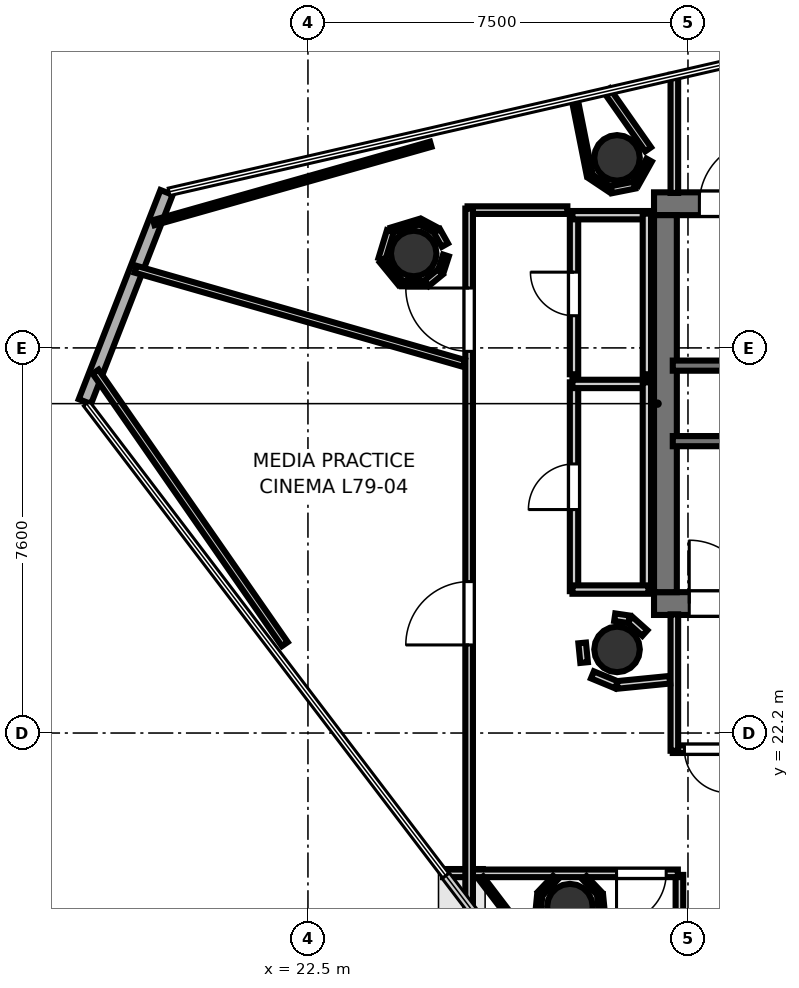
"""IFC4 building model, lengths in metres.
Left out: names, types, materials, properties, quantities, classifications, styles, units other than length and angle.
Written with IfcOpenShell. Run it as: python <this file> out.ifc"""

import sys

from ifc_helpers import new_model, si_unit, direction, frame, frame_2d, origin, origin_2d, place, context, subcontext, project, spatial, rectangle, hollow_circle, extrude, element, fill, save


model = new_model("IFC4")
c1 = context("Model", 3, precision=1e-05, world=origin(), true_north=direction((0.0, 1.0)))
c2 = subcontext(c1, "Body", "Model", "MODEL_VIEW")
j1 = project(units=[si_unit("LENGTHUNIT", "METRE"), si_unit("PLANEANGLEUNIT", "RADIAN")], contexts=[c1])
p1 = place(None, origin())
s1 = spatial("IfcSite", under=j1, at=p1, CompositionType="ELEMENT")
p2 = place(p1, origin())
s2 = spatial("IfcBuilding", under=s1, at=p2, CompositionType="ELEMENT")
p3 = place(p2, frame((0.0, 0.0, 306.5)))
s3 = spatial("IfcBuildingStorey", under=s2, at=p3, CompositionType="ELEMENT", Elevation=306.5)
p4 = place(p3, frame((29.33, 32.645, 0.0), z_axis=(0.0, 0.0, 1.0), x_axis=(1.0, 0.0, 0.0)))
e1 = element("IfcWall", 1, at=p4, inside=s3, PredefinedType="SHEAR", context=c2, shape_type="SweptSolid", body=[
    extrude(rectangle(XDim=10.52, YDim=0.45, at=frame_2d((5.26, 0.0))), origin(), (0.0, 0.0, 1.0), 3.52),
])
p5 = place(p4, frame((0.895, 0.0, 0.0)))
e2 = element("IfcOpeningElement", 2, at=p5, cuts=e1, PredefinedType="OPENING", context=c2, shape_type="SweptSolid", body=[
    extrude(rectangle(XDim=1.25, YDim=2.15, at=frame_2d((0.625, 1.075))), frame((0.0, 0.235, 0.0), z_axis=(0.0, -1.0, 0.0), x_axis=(1.0, 0.0, 0.0)), (0.0, 0.0, 1.0), 0.47),
])
p6 = place(p3, frame((29.33, 24.755, 0.0), z_axis=(0.0, 0.0, 1.0), x_axis=(1.0, 0.0, 0.0)))
e3 = element("IfcWall", 3, at=p6, inside=s3, PredefinedType="SHEAR", context=c2, shape_type="SweptSolid", body=[
    extrude(rectangle(XDim=10.52, YDim=0.45, at=frame_2d((5.26, 0.0))), origin(), (0.0, 0.0, 1.0), 3.52),
])
p7 = place(p6, frame((0.695, 0.0, 0.0)))
e4 = element("IfcOpeningElement", 4, at=p7, cuts=e3, PredefinedType="OPENING", context=c2, shape_type="SweptSolid", body=[
    extrude(rectangle(XDim=1.25, YDim=2.15, at=frame_2d((0.625, 1.075))), frame((0.0, 0.235, 0.0), z_axis=(0.0, -1.0, 0.0), x_axis=(1.0, 0.0, 0.0)), (0.0, 0.0, 1.0), 0.47),
])
p8 = place(p3, frame((29.555, 24.98, 0.0), z_axis=(0.0, 0.0, 1.0), x_axis=(0.0, 1.0, 0.0)))
e5 = element("IfcWall", 5, at=p8, inside=s3, PredefinedType="SHEAR", context=c2, shape_type="SweptSolid", body=[
    extrude(rectangle(XDim=7.44, YDim=0.45, at=frame_2d((3.72, 0.0))), origin(), (0.0, 0.0, 1.0), 3.52),
])
for number, where, z_axis, x_axis in (
    (6, (28.6, 33.55, 0.0), (0.0, 0.0, 1.0), (1.0, 0.0, 0.0)),
    (7, (28.6, 23.85, 0.0), (0.0, 0.0, 1.0), (1.0, 0.0, 0.0)),
    (8, (24.587, 31.663, 0.0), (0.0, 0.0, 1.0), (1.0, 0.0, 0.0)),
    (9, (27.67, 18.774, 0.0), (0.0, 0.0, 1.0), (1.0, 0.0, 0.0)),
):
    element("IfcColumn", number, at=place(p3, frame(where, z_axis=z_axis, x_axis=x_axis)), inside=s3, PredefinedType="COLUMN", context=c2, shape_type="SweptSolid", body=[
        extrude(hollow_circle(Radius=0.45, WallThickness=0.025, at=origin_2d()), origin(), (0.0, 0.0, 1.0), 3.7),
    ])
p9 = place(p3, frame((19.71, 32.869, 0.0), z_axis=(0.0, 0.0, 1.0), x_axis=(-0.363769866346, -0.931488853577, 0.0)))
e10 = element("IfcWall", 10, at=p9, inside=s3, PredefinedType="SOLIDWALL", context=c2, shape_type="SweptSolid", body=[
    extrude(rectangle(XDim=4.432, YDim=0.26, at=frame_2d((2.216, 0.0))), origin(), (0.0, 0.0, 1.0), 3.52),
])
p10 = place(p3, frame((29.7, 29.45, 0.0), z_axis=(0.0, 0.0, 1.0), x_axis=(1.0, 0.0, 0.0)))
e11 = element("IfcWall", 11, at=p10, inside=s3, PredefinedType="SOLIDWALL", context=c2, shape_type="SweptSolid", body=[
    extrude(rectangle(XDim=8.3, YDim=0.2, at=frame_2d((4.15, 0.0))), origin(), (0.0, 0.0, 1.0), 3.52),
])
p11 = place(p3, frame((29.7, 27.96, 0.0), z_axis=(0.0, 0.0, 1.0), x_axis=(1.0, 0.0, 0.0)))
e12 = element("IfcWall", 12, at=p11, inside=s3, PredefinedType="SOLIDWALL", context=c2, shape_type="SweptSolid", body=[
    extrude(rectangle(XDim=7.75, YDim=0.2, at=frame_2d((3.875, 0.0))), origin(), (0.0, 0.0, 1.0), 3.52),
])
p12 = place(p3, frame((29.731, 32.858, 0.0), z_axis=(0.0, 0.0, 1.0), x_axis=(0.0, 1.0, 0.0)))
e13 = element("IfcWall", 13, at=p12, inside=s3, PredefinedType="PARTITIONING", context=c2, shape_type="SweptSolid", body=[
    extrude(rectangle(XDim=2.331, YDim=0.15, at=frame_2d((1.166, 0.0))), origin(), (0.0, 0.0, 1.0), 2.84),
])
p13 = place(p3, frame((33.45, 21.881, 0.0), z_axis=(0.0, 0.0, 1.0), x_axis=(-1.0, 0.0, 0.0)))
e14 = element("IfcWall", 14, at=p13, inside=s3, PredefinedType="PARTITIONING", context=c2, shape_type="SweptSolid", body=[
    extrude(rectangle(XDim=3.75, YDim=0.15, at=frame_2d((1.875, 0.0))), origin(), (0.0, 0.0, 1.0), 2.84),
])
p14 = place(p13, frame((1.275, 0.0, 0.0)))
e15 = element("IfcOpeningElement", 15, at=p14, cuts=e14, PredefinedType="OPENING", context=c2, shape_type="SweptSolid", body=[
    extrude(rectangle(XDim=1.2, YDim=2.15, at=frame_2d((0.6, 1.075))), frame((0.0, 0.085, 0.0), z_axis=(0.0, -1.0, 0.0), x_axis=(1.0, 0.0, 0.0)), (0.0, 0.0, 1.0), 0.17),
])
p15 = place(p13, frame((2.66, 0.0, 0.0)))
e16 = element("IfcOpeningElement", 16, at=p15, cuts=e14, PredefinedType="OPENING", context=c2, shape_type="SweptSolid", body=[
    extrude(rectangle(XDim=0.86, YDim=2.05, at=frame_2d((0.43, 1.025))), frame((0.0, 0.085, 0.0), z_axis=(0.0, -1.0, 0.0), x_axis=(1.0, 0.0, 0.0)), (0.0, 0.0, 1.0), 0.17),
])
p16 = place(p3, frame((29.731, 21.85, 0.0), z_axis=(0.0, 0.0, 1.0), x_axis=(0.0, 1.0, 0.0)))
e17 = element("IfcWall", 17, at=p16, inside=s3, PredefinedType="PARTITIONING", context=c2, shape_type="SweptSolid", body=[
    extrude(rectangle(XDim=2.692, YDim=0.15, at=frame_2d((1.346, 0.0))), origin(), (0.0, 0.0, 1.0), 2.84),
])
p17 = place(p3, frame((27.751, 25.0, 0.0), z_axis=(0.0, 0.0, 1.0), x_axis=(0.0, 1.0, 0.0)))
e18 = element("IfcWall", 18, at=p17, inside=s3, PredefinedType="PLUMBINGWALL", context=c2, shape_type="SweptSolid", body=[
    extrude(rectangle(XDim=4.12, YDim=0.165, at=frame_2d((2.06, 0.0))), origin(), (0.0, 0.0, 1.0), 2.84),
])
p18 = place(p17, frame((1.61, 0.0, 0.0)))
e19 = element("IfcOpeningElement", 19, at=p18, cuts=e18, PredefinedType="OPENING", context=c2, shape_type="SweptSolid", body=[
    extrude(rectangle(XDim=0.9, YDim=2.1, at=frame_2d((0.45, 1.05))), frame((0.0, 0.093, 0.0), z_axis=(0.0, -1.0, 0.0), x_axis=(1.0, 0.0, 0.0)), (0.0, 0.0, 1.0), 0.185),
])
p19 = place(p3, frame((27.72, 29.089, 0.0), z_axis=(0.0, 0.0, 1.0), x_axis=(1.0, 0.0, 0.0)))
e20 = element("IfcWall", 20, at=p19, inside=s3, PredefinedType="PLUMBINGWALL", context=c2, shape_type="SweptSolid", body=[
    extrude(rectangle(XDim=1.5, YDim=0.165, at=frame_2d((0.75, 0.0))), origin(), (0.0, 0.0, 1.0), 2.84),
])
p20 = place(p3, frame((29.189, 29.12, 0.0), z_axis=(0.0, 0.0, 1.0), x_axis=(0.0, -1.0, 0.0)))
e21 = element("IfcWall", 21, at=p20, inside=s3, PredefinedType="PLUMBINGWALL", context=c2, shape_type="SweptSolid", body=[
    extrude(rectangle(XDim=4.12, YDim=0.165, at=frame_2d((2.06, 0.0))), origin(), (0.0, 0.0, 1.0), 2.84),
])
p21 = place(p3, frame((29.22, 25.031, 0.0), z_axis=(0.0, 0.0, 1.0), x_axis=(-1.0, 0.0, 0.0)))
e22 = element("IfcWall", 22, at=p21, inside=s3, PredefinedType="PLUMBINGWALL", context=c2, shape_type="SweptSolid", body=[
    extrude(rectangle(XDim=1.5, YDim=0.165, at=frame_2d((0.75, 0.0))), origin(), (0.0, 0.0, 1.0), 2.84),
])
p22 = place(p3, frame((27.751, 29.28, 0.0), z_axis=(0.0, 0.0, 1.0), x_axis=(0.0, 1.0, 0.0)))
e23 = element("IfcWall", 23, at=p22, inside=s3, PredefinedType="PLUMBINGWALL", context=c2, shape_type="SweptSolid", body=[
    extrude(rectangle(XDim=3.17, YDim=0.165, at=frame_2d((1.585, 0.0))), origin(), (0.0, 0.0, 1.0), 2.84),
])
p23 = place(p22, frame((1.155, 0.0, 0.0)))
e24 = element("IfcOpeningElement", 24, at=p23, cuts=e23, PredefinedType="OPENING", context=c2, shape_type="SweptSolid", body=[
    extrude(rectangle(XDim=0.86, YDim=2.05, at=frame_2d((0.43, 1.025))), frame((0.0, 0.093, 0.0), z_axis=(0.0, -1.0, 0.0), x_axis=(1.0, 0.0, 0.0)), (0.0, 0.0, 1.0), 0.185),
])
p24 = place(p3, frame((27.72, 32.419, 0.0), z_axis=(0.0, 0.0, 1.0), x_axis=(1.0, 0.0, 0.0)))
e25 = element("IfcWall", 25, at=p24, inside=s3, PredefinedType="PLUMBINGWALL", context=c2, shape_type="SweptSolid", body=[
    extrude(rectangle(XDim=1.5, YDim=0.165, at=frame_2d((0.75, 0.0))), origin(), (0.0, 0.0, 1.0), 2.84),
])
p25 = place(p3, frame((29.189, 32.45, 0.0), z_axis=(0.0, 0.0, 1.0), x_axis=(0.0, -1.0, 0.0)))
e26 = element("IfcWall", 26, at=p25, inside=s3, PredefinedType="PLUMBINGWALL", context=c2, shape_type="SweptSolid", body=[
    extrude(rectangle(XDim=3.17, YDim=0.165, at=frame_2d((1.585, 0.0))), origin(), (0.0, 0.0, 1.0), 2.84),
])
p26 = place(p3, frame((29.149, 24.173, 0.0), z_axis=(0.0, 0.0, 1.0), x_axis=(-0.745225165416, 0.666812906917, 0.0)))
e27 = element("IfcWall", 27, at=p26, inside=s3, PredefinedType="PARTITIONING", context=c2, shape_type="SweptSolid", body=[
    extrude(rectangle(XDim=0.396, YDim=0.15, at=frame_2d((0.198, 0.0))), origin(), (0.0, 0.0, 1.0), 2.84),
])
p27 = place(p3, frame((28.838, 24.444, 0.0), z_axis=(0.0, 0.0, 1.0), x_axis=(-0.989449148305, 0.144880581578, 0.0)))
e28 = element("IfcWall", 28, at=p27, inside=s3, PredefinedType="PARTITIONING", context=c2, shape_type="SweptSolid", body=[
    extrude(rectangle(XDim=0.286, YDim=0.15, at=frame_2d((0.143, 0.0))), origin(), (0.0, 0.0, 1.0), 2.84),
])
p28 = place(p3, frame((25.65, 32.519, 0.0), z_axis=(0.0, 0.0, 1.0), x_axis=(1.0, 0.0, 0.0)))
e29 = element("IfcWall", 29, at=p28, inside=s3, PredefinedType="PARTITIONING", context=c2, shape_type="SweptSolid", body=[
    extrude(rectangle(XDim=1.97, YDim=0.15, at=frame_2d((0.985, 0.0))), origin(), (0.0, 0.0, 1.0), 2.84),
])
p29 = place(p3, frame((27.912, 23.978, 0.0), z_axis=(0.0, 0.0, 1.0), x_axis=(0.097888269922, -0.995197410875, 0.0)))
e30 = element("IfcWall", 30, at=p29, inside=s3, PredefinedType="PARTITIONING", context=c2, shape_type="SweptSolid", body=[
    extrude(rectangle(XDim=0.389, YDim=0.15, at=frame_2d((0.195, 0.0))), origin(), (0.0, 0.0, 1.0), 2.84),
])
p30 = place(p3, frame((28.115, 23.348, 0.0), z_axis=(0.0, 0.0, 1.0), x_axis=(0.923807847969, -0.382856448334, 0.0)))
e31 = element("IfcWall", 31, at=p30, inside=s3, PredefinedType="PARTITIONING", context=c2, shape_type="SweptSolid", body=[
    extrude(rectangle(XDim=0.513, YDim=0.15, at=frame_2d((0.256, 0.0))), origin(), (0.0, 0.0, 1.0), 2.84),
])
p31 = place(p3, frame((28.603, 23.149, 0.0), z_axis=(0.0, 0.0, 1.0), x_axis=(0.995179827095, 0.098066873836, 0.0)))
e32 = element("IfcWall", 32, at=p31, inside=s3, PredefinedType="PARTITIONING", context=c2, shape_type="SweptSolid", body=[
    extrude(rectangle(XDim=1.043, YDim=0.15, at=frame_2d((0.521, 0.0))), origin(), (0.0, 0.0, 1.0), 2.84),
])
p32 = place(p3, frame((29.831, 16.05, 0.0), z_axis=(0.0, 0.0, 1.0), x_axis=(0.0, 1.0, 0.0)))
e33 = element("IfcWall", 33, at=p32, inside=s3, PredefinedType="PARTITIONING", context=c2, shape_type="SweptSolid", body=[
    extrude(rectangle(XDim=3.35, YDim=0.15, at=frame_2d((1.675, 0.0))), origin(), (0.0, 0.0, 1.0), 2.84),
])
p33 = place(p3, frame((29.8, 19.431, 0.0), z_axis=(0.0, 0.0, 1.0), x_axis=(-1.0, 0.0, 0.0)))
e34 = element("IfcWall", 34, at=p33, inside=s3, PredefinedType="PARTITIONING", context=c2, shape_type="SweptSolid", body=[
    extrude(rectangle(XDim=4.635, YDim=0.15, at=frame_2d((2.318, 0.0))), origin(), (0.0, 0.0, 1.0), 2.84),
])
p34 = place(p33, frame((0.23, 0.0, 0.0)))
e35 = element("IfcOpeningElement", 35, at=p34, cuts=e34, PredefinedType="OPENING", context=c2, shape_type="SweptSolid", body=[
    extrude(rectangle(XDim=0.98, YDim=2.1, at=frame_2d((0.49, 1.05))), frame((0.0, 0.085, 0.0), z_axis=(0.0, -1.0, 0.0), x_axis=(1.0, 0.0, 0.0)), (0.0, 0.0, 1.0), 0.17),
])
p35 = place(p3, frame((25.681, 18.759, 0.0), z_axis=(0.0, 0.0, 1.0), x_axis=(0.0, 1.0, 0.0)))
e36 = element("IfcWall", 36, at=p35, inside=s3, PredefinedType="PARTITIONING", context=c2, shape_type="SweptSolid", body=[
    extrude(rectangle(XDim=13.791, YDim=0.15, at=frame_2d((6.896, 0.0))), origin(), (0.0, 0.0, 1.0), 2.84),
])
p36 = place(p35, frame((10.973, 0.0, 0.0)))
e37 = element("IfcOpeningElement", 37, at=p36, cuts=e36, PredefinedType="OPENING", context=c2, shape_type="SweptSolid", body=[
    extrude(rectangle(XDim=1.25, YDim=2.2, at=frame_2d((0.625, 1.1))), frame((0.0, 0.085, 0.0), z_axis=(0.0, -1.0, 0.0), x_axis=(1.0, 0.0, 0.0)), (0.0, 0.0, 1.0), 0.17),
])
p37 = place(p35, frame((5.179, 0.0, 0.0)))
e38 = element("IfcOpeningElement", 38, at=p37, cuts=e36, PredefinedType="OPENING", context=c2, shape_type="SweptSolid", body=[
    extrude(rectangle(XDim=1.25, YDim=2.2, at=frame_2d((0.625, 1.1))), frame((0.0, 0.085, 0.0), z_axis=(0.0, -1.0, 0.0), x_axis=(1.0, 0.0, 0.0)), (0.0, 0.0, 1.0), 0.17),
])
p38 = place(p3, frame((33.149, 9.837, 0.0), z_axis=(0.0, 0.0, 1.0), x_axis=(-0.605712382607, 0.795683674306, 0.0)))
e39 = element("IfcWall", 39, at=p38, inside=s3, PredefinedType="PARTITIONING", context=c2, shape_type="SweptSolid", body=[
    extrude(rectangle(XDim=11.942, YDim=0.105, at=frame_2d((5.971, 0.0))), origin(), (0.0, 0.0, 1.0), 2.84),
])
p39 = place(p3, frame((27.381, 19.341, 0.0), z_axis=(0.0, 0.0, 1.0), x_axis=(-0.689047004353, -0.724716652073, 0.0)))
e40 = element("IfcWall", 40, at=p39, inside=s3, PredefinedType="PARTITIONING", context=c2, shape_type="SweptSolid", body=[
    extrude(rectangle(XDim=0.431, YDim=0.12, at=frame_2d((0.216, 0.0))), origin(), (0.0, 0.0, 1.0), 2.84),
])
p40 = place(p3, frame((27.076, 19.01, 0.0), z_axis=(0.0, 0.0, 1.0), x_axis=(-0.0979929155, -0.995187112312, 0.0)))
e41 = element("IfcWall", 41, at=p40, inside=s3, PredefinedType="PARTITIONING", context=c2, shape_type="SweptSolid", body=[
    extrude(rectangle(XDim=1.856, YDim=0.105, at=frame_2d((0.928, 0.0))), origin(), (0.0, 0.0, 1.0), 2.84),
])
p41 = place(p3, frame((28.299, 18.658, 0.0), z_axis=(0.0, 0.0, 1.0), x_axis=(-0.097865889817, 0.995199611942, 0.0)))
e42 = element("IfcWall", 42, at=p41, inside=s3, PredefinedType="PARTITIONING", context=c2, shape_type="SweptSolid", body=[
    extrude(rectangle(XDim=0.354, YDim=0.12, at=frame_2d((0.177, 0.0))), origin(), (0.0, 0.0, 1.0), 2.84),
])
p42 = place(p3, frame((28.256, 19.029, 0.0), z_axis=(0.0, 0.0, 1.0), x_axis=(-0.689344198757, 0.724433969137, 0.0)))
e43 = element("IfcWall", 43, at=p42, inside=s3, PredefinedType="PARTITIONING", context=c2, shape_type="SweptSolid", body=[
    extrude(rectangle(XDim=0.431, YDim=0.105, at=frame_2d((0.216, 0.0))), origin(), (0.0, 0.0, 1.0), 2.84),
])
p43 = place(p3, frame((25.203, 31.829, 0.0), z_axis=(0.0, 0.0, 1.0), x_axis=(-0.488926990846, 0.872324708823, 0.0)))
e44 = element("IfcWall", 44, at=p43, inside=s3, PredefinedType="PARTITIONING", context=c2, shape_type="SweptSolid", body=[
    extrude(rectangle(XDim=0.322, YDim=0.14, at=frame_2d((0.161, 0.0))), origin(), (0.0, 0.0, 1.0), 2.84),
])
p44 = place(p3, frame((25.033, 32.122, 0.0), z_axis=(0.0, 0.0, 1.0), x_axis=(-0.881817981942, 0.471589913721, 0.0)))
e45 = element("IfcWall", 45, at=p44, inside=s3, PredefinedType="PARTITIONING", context=c2, shape_type="SweptSolid", body=[
    extrude(rectangle(XDim=0.354, YDim=0.12, at=frame_2d((0.177, 0.0))), origin(), (0.0, 0.0, 1.0), 2.84),
])
p45 = place(p3, frame((24.697, 32.291, 0.0), z_axis=(0.0, 0.0, 1.0), x_axis=(-0.956910072495, -0.290384423064, 0.0)))
e46 = element("IfcWall", 46, at=p45, inside=s3, PredefinedType="PARTITIONING", context=c2, shape_type="SweptSolid", body=[
    extrude(rectangle(XDim=0.575, YDim=0.105, at=frame_2d((0.288, 0.0))), origin(), (0.0, 0.0, 1.0), 2.84),
])
p46 = place(p3, frame((24.126, 32.103, 0.0), z_axis=(0.0, 0.0, 1.0), x_axis=(-0.290384423064, -0.956910072495, 0.0)))
e47 = element("IfcWall", 47, at=p46, inside=s3, PredefinedType="PARTITIONING", context=c2, shape_type="SweptSolid", body=[
    extrude(rectangle(XDim=0.575, YDim=0.14, at=frame_2d((0.288, 0.0))), origin(), (0.0, 0.0, 1.0), 2.84),
])
p47 = place(p3, frame((23.965, 31.524, 0.0), z_axis=(0.0, 0.0, 1.0), x_axis=(0.634277575631, -0.77310539841, 0.0)))
e48 = element("IfcWall", 48, at=p47, inside=s3, PredefinedType="PARTITIONING", context=c2, shape_type="SweptSolid", body=[
    extrude(rectangle(XDim=0.575, YDim=0.12, at=frame_2d((0.288, 0.0))), origin(), (0.0, 0.0, 1.0), 2.84),
])
p48 = place(p3, frame((24.354, 31.068, 0.0), z_axis=(0.0, 0.0, 1.0), x_axis=(1.0, 0.0, 0.0)))
e49 = element("IfcWall", 49, at=p48, inside=s3, PredefinedType="PARTITIONING", context=c2, shape_type="SweptSolid", body=[
    extrude(rectangle(XDim=0.467, YDim=0.105, at=frame_2d((0.233, 0.0))), origin(), (0.0, 0.0, 1.0), 2.84),
])
p49 = place(p3, frame((24.84, 31.075, 0.0), z_axis=(0.0, 0.0, 1.0), x_axis=(0.773281307259, 0.634063103992, 0.0)))
e50 = element("IfcWall", 50, at=p49, inside=s3, PredefinedType="PARTITIONING", context=c2, shape_type="SweptSolid", body=[
    extrude(rectangle(XDim=0.354, YDim=0.14, at=frame_2d((0.177, 0.0))), origin(), (0.0, 0.0, 1.0), 2.84),
])
p50 = place(p3, frame((25.124, 31.315, 0.0), z_axis=(0.0, 0.0, 1.0), x_axis=(0.306761714687, 0.951786347035, 0.0)))
e51 = element("IfcWall", 51, at=p50, inside=s3, PredefinedType="PARTITIONING", context=c2, shape_type="SweptSolid", body=[
    extrude(rectangle(XDim=0.325, YDim=0.12, at=frame_2d((0.163, 0.0))), origin(), (0.0, 0.0, 1.0), 2.84),
])
p51 = place(p3, frame((25.579, 29.494, 0.0), z_axis=(0.0, 0.0, 1.0), x_axis=(-0.961265309794, 0.275624752494, 0.0)))
e52 = element("IfcWall", 52, at=p51, inside=s3, PredefinedType="PARTITIONING", context=c2, shape_type="SweptSolid", body=[
    extrude(rectangle(XDim=6.743, YDim=0.14, at=frame_2d((3.372, 0.0))), origin(), (0.0, 0.0, 1.0), 2.84),
])
p52 = place(p3, frame((19.459, 32.271, 0.0), z_axis=(0.0, 0.0, 1.0), x_axis=(0.962150773197, 0.272517686833, 0.0)))
e53 = element("IfcWall", 53, at=p52, inside=s3, PredefinedType="PARTITIONING", context=c2, shape_type="SweptSolid", body=[
    extrude(rectangle(XDim=5.68, YDim=0.105, at=frame_2d((2.84, 0.0))), origin(), (0.0, 0.0, 1.0), 2.84),
])
p53 = place(p3, frame((29.214, 33.719, 0.0), z_axis=(0.0, 0.0, 1.0), x_axis=(-0.573981241373, 0.818868447647, 0.0)))
e54 = element("IfcWall", 54, at=p53, inside=s3, PredefinedType="PARTITIONING", context=c2, shape_type="SweptSolid", body=[
    extrude(rectangle(XDim=1.421, YDim=0.14, at=frame_2d((0.71, 0.0))), origin(), (0.0, 0.0, 1.0), 2.84),
])
p54 = place(p3, frame((27.758, 34.736, 0.0), z_axis=(0.0, 0.0, 1.0), x_axis=(0.195153744134, -0.980772662828, 0.0)))
e55 = element("IfcWall", 55, at=p54, inside=s3, PredefinedType="PARTITIONING", context=c2, shape_type="SweptSolid", body=[
    extrude(rectangle(XDim=1.561, YDim=0.12, at=frame_2d((0.781, 0.0))), origin(), (0.0, 0.0, 1.0), 2.84),
])
p55 = place(p3, frame((28.076, 33.185, 0.0), z_axis=(0.0, 0.0, 1.0), x_axis=(0.831325644669, -0.555785635398, 0.0)))
e56 = element("IfcWall", 56, at=p55, inside=s3, PredefinedType="PARTITIONING", context=c2, shape_type="SweptSolid", body=[
    extrude(rectangle(XDim=0.467, YDim=0.105, at=frame_2d((0.233, 0.0))), origin(), (0.0, 0.0, 1.0), 2.84),
])
p56 = place(p3, frame((28.487, 32.921, 0.0), z_axis=(0.0, 0.0, 1.0), x_axis=(0.980781345641, 0.19511010236, 0.0)))
e57 = element("IfcWall", 57, at=p56, inside=s3, PredefinedType="PARTITIONING", context=c2, shape_type="SweptSolid", body=[
    extrude(rectangle(XDim=0.467, YDim=0.14, at=frame_2d((0.233, 0.0))), origin(), (0.0, 0.0, 1.0), 2.84),
])
p57 = place(p3, frame((28.966, 33.028, 0.0), z_axis=(0.0, 0.0, 1.0), x_axis=(0.489267492682, 0.872133774489, 0.0)))
e58 = element("IfcWall", 58, at=p57, inside=s3, PredefinedType="PARTITIONING", context=c2, shape_type="SweptSolid", body=[
    extrude(rectangle(XDim=0.548, YDim=0.12, at=frame_2d((0.274, 0.0))), origin(), (0.0, 0.0, 1.0), 2.84),
])
p58 = place(p3, frame((22.043, 23.954, 0.0), z_axis=(0.0, 0.0, 1.0), x_axis=(-0.570376937769, 0.821383070718, 0.0)))
e59 = element("IfcWall", 59, at=p58, inside=s3, PredefinedType="PARTITIONING", context=c2, shape_type="SweptSolid", body=[
    extrude(rectangle(XDim=6.546, YDim=0.14, at=frame_2d((3.273, 0.0))), origin(), (0.0, 0.0, 1.0), 2.84),
])
p59 = place(p5, origin())
e60 = element("IfcDoor", 60, at=p59, inside=s3, OperationType="SINGLE_SWING_RIGHT", PredefinedType="DOOR", context=c2, shape_type="SweptSolid", body=[
    extrude(rectangle(XDim=1.25, YDim=2.15, at=frame_2d((0.625, 1.075))), frame((0.0, 0.025, 0.0), z_axis=(0.0, -1.0, 0.0), x_axis=(1.0, 0.0, 0.0)), (0.0, 0.0, 1.0), 0.05),
])
fill(e2, e60)
p60 = place(p7, origin())
e61 = element("IfcDoor", 61, at=p60, inside=s3, OperationType="SINGLE_SWING_LEFT", PredefinedType="DOOR", context=c2, shape_type="SweptSolid", body=[
    extrude(rectangle(XDim=1.25, YDim=2.15, at=frame_2d((0.625, 1.075))), frame((0.0, 0.025, 0.0), z_axis=(0.0, -1.0, 0.0), x_axis=(1.0, 0.0, 0.0)), (0.0, 0.0, 1.0), 0.05),
])
fill(e4, e61)
p61 = place(p18, origin())
e62 = element("IfcDoor", 62, at=p61, inside=s3, OperationType="SINGLE_SWING_LEFT", PredefinedType="DOOR", context=c2, shape_type="SweptSolid", body=[
    extrude(rectangle(XDim=0.9, YDim=2.1, at=frame_2d((0.45, 1.05))), frame((0.0, 0.025, 0.0), z_axis=(0.0, -1.0, 0.0), x_axis=(1.0, 0.0, 0.0)), (0.0, 0.0, 1.0), 0.05),
])
fill(e19, e62)
p62 = place(p23, origin())
e63 = element("IfcDoor", 63, at=p62, inside=s3, OperationType="SINGLE_SWING_RIGHT", PredefinedType="DOOR", context=c2, shape_type="SweptSolid", body=[
    extrude(rectangle(XDim=0.86, YDim=2.05, at=frame_2d((0.43, 1.025))), frame((0.0, 0.025, 0.0), z_axis=(0.0, -1.0, 0.0), x_axis=(1.0, 0.0, 0.0)), (0.0, 0.0, 1.0), 0.05),
])
fill(e24, e63)
p63 = place(p15, origin())
e64 = element("IfcDoor", 64, at=p63, inside=s3, OperationType="SINGLE_SWING_LEFT", PredefinedType="DOOR", context=c2, shape_type="SweptSolid", body=[
    extrude(rectangle(XDim=0.86, YDim=2.05, at=frame_2d((0.43, 1.025))), frame((0.0, 0.025, 0.0), z_axis=(0.0, -1.0, 0.0), x_axis=(1.0, 0.0, 0.0)), (0.0, 0.0, 1.0), 0.05),
])
fill(e16, e64)
p64 = place(p34, origin())
e65 = element("IfcDoor", 65, at=p64, inside=s3, OperationType="SINGLE_SWING_RIGHT", PredefinedType="DOOR", context=c2, shape_type="SweptSolid", body=[
    extrude(rectangle(XDim=0.98, YDim=2.1, at=frame_2d((0.49, 1.05))), frame((0.0, 0.025, 0.0), z_axis=(0.0, -1.0, 0.0), x_axis=(1.0, 0.0, 0.0)), (0.0, 0.0, 1.0), 0.05),
])
fill(e35, e65)
p65 = place(p36, origin())
e66 = element("IfcDoor", 66, at=p65, inside=s3, OperationType="SINGLE_SWING_RIGHT", PredefinedType="DOOR", context=c2, shape_type="SweptSolid", body=[
    extrude(rectangle(XDim=1.25, YDim=2.2, at=frame_2d((0.625, 1.1))), frame((0.0, 0.025, 0.0), z_axis=(0.0, -1.0, 0.0), x_axis=(1.0, 0.0, 0.0)), (0.0, 0.0, 1.0), 0.05),
])
fill(e37, e66)
p66 = place(p37, origin())
e67 = element("IfcDoor", 67, at=p66, inside=s3, OperationType="SINGLE_SWING_LEFT", PredefinedType="DOOR", context=c2, shape_type="SweptSolid", body=[
    extrude(rectangle(XDim=1.25, YDim=2.2, at=frame_2d((0.625, 1.1))), frame((0.0, 0.025, 0.0), z_axis=(0.0, -1.0, 0.0), x_axis=(1.0, 0.0, 0.0)), (0.0, 0.0, 1.0), 0.05),
])
fill(e38, e67)
save(model, sys.argv[1])
